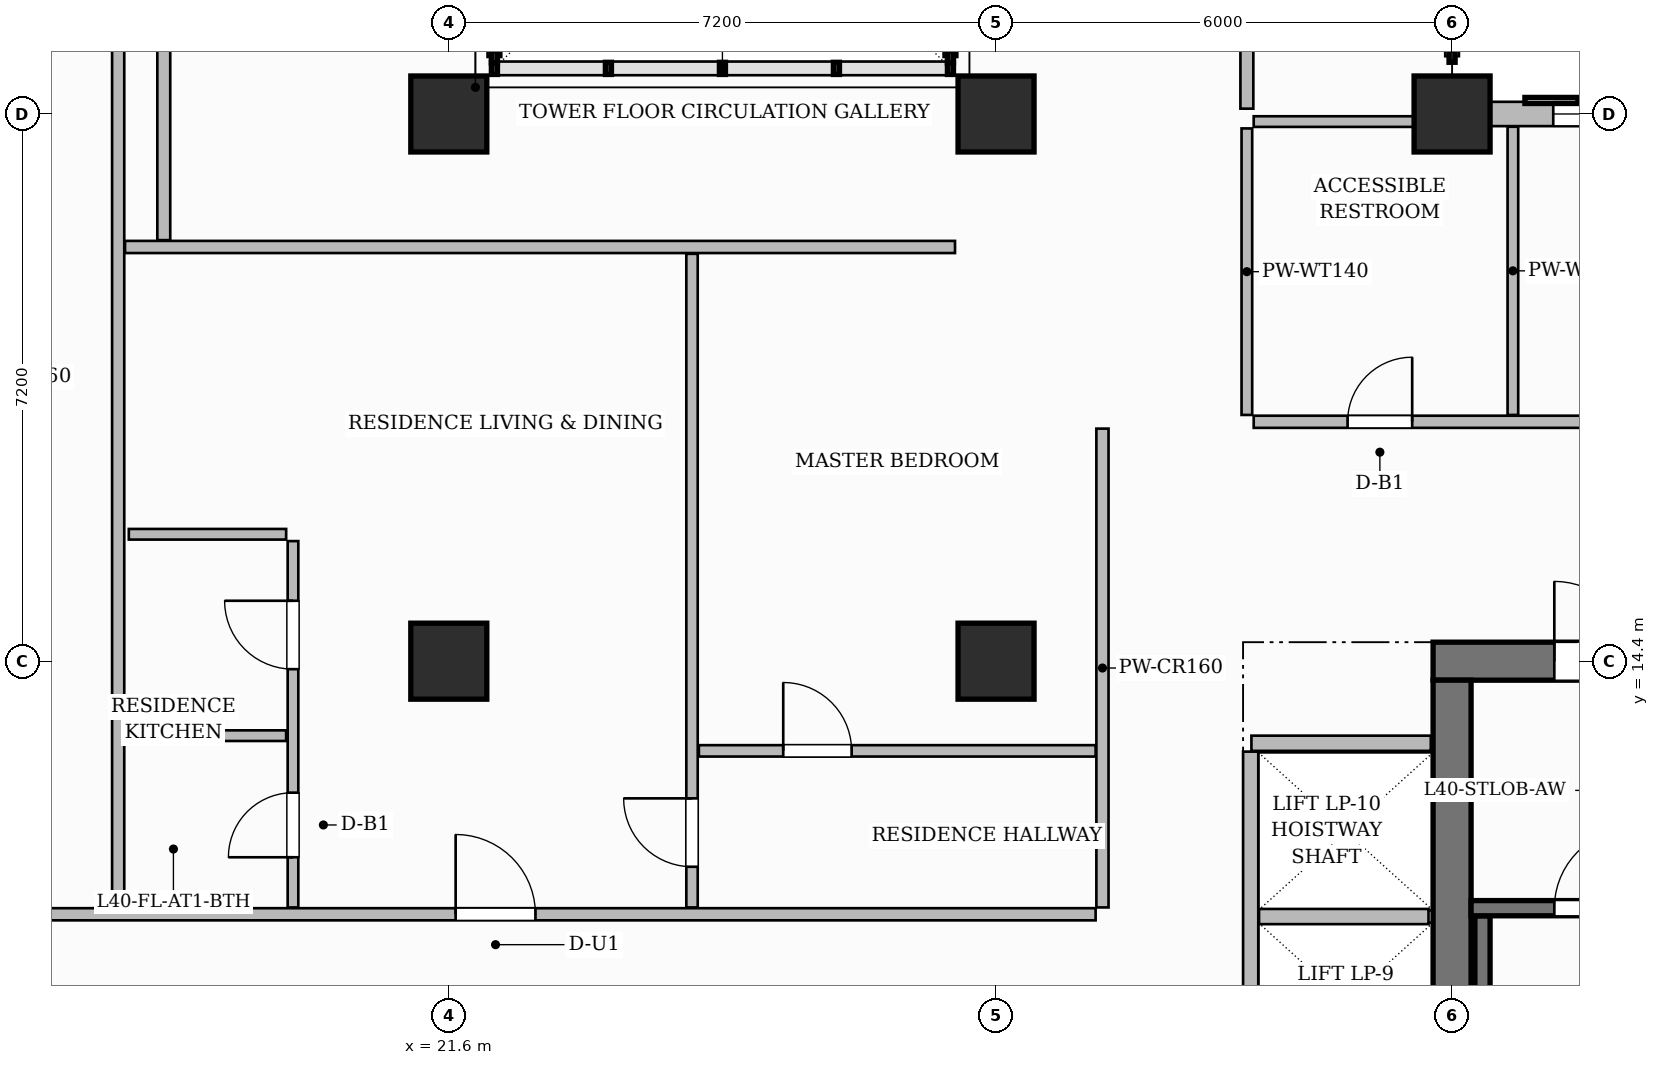
"""IFC4 building model, lengths in metres.
Left out: names, types, materials, properties, quantities, classifications, styles, units other than length and angle.
Written with IfcOpenShell. Run it as: python <this file> out.ifc"""

import sys

from ifc_helpers import new_model, si_unit, direction, frame, frame_2d, origin, origin_2d, place, context, subcontext, project, spatial, rectangle, extrude, source, transform, mapped, element, fill, save


model = new_model("IFC4")
c1 = context("Model", 3, precision=1e-05, world=origin(), true_north=direction((0.0, 1.0)))
c2 = subcontext(c1, "Body", "Model", "MODEL_VIEW")
j1 = project(units=[si_unit("LENGTHUNIT", "METRE"), si_unit("PLANEANGLEUNIT", "RADIAN")], contexts=[c1])
p1 = place(None, origin())
s1 = spatial("IfcSite", under=j1, at=p1, CompositionType="ELEMENT")
p2 = place(p1, origin())
s2 = spatial("IfcBuilding", under=s1, at=p2, CompositionType="ELEMENT")
p3 = place(p2, frame((0.0, 0.0, 161.85)))
s3 = spatial("IfcBuildingStorey", under=s2, at=p3, CompositionType="ELEMENT", Elevation=161.85)
p4 = place(p3, frame((34.55, 14.4, 0.0), z_axis=(0.0, 0.0, 1.0), x_axis=(1.0, 0.0, 0.0)))
e1 = element("IfcWall", 1, at=p4, inside=s3, PredefinedType="SHEAR", context=c2, shape_type="SweptSolid", body=[
    extrude(rectangle(XDim=15.5, YDim=0.5, at=frame_2d((7.75, 0.0))), origin(), (0.0, 0.0, 1.0), 3.85),
])
p5 = place(p4, frame((5.38, 0.0, 0.0)))
e2 = element("IfcOpeningElement", 2, at=p5, cuts=e1, PredefinedType="OPENING", context=c2, shape_type="SweptSolid", body=[
    extrude(rectangle(XDim=1.5, YDim=2.2, at=frame_2d((0.75, 1.1))), frame((0.0, 0.26, 0.0), z_axis=(0.0, -1.0, 0.0), x_axis=(1.0, 0.0, 0.0)), (0.0, 0.0, 1.0), 0.52),
])
p6 = place(p4, frame((1.595, 0.0, 0.0)))
e3 = element("IfcOpeningElement", 3, at=p6, cuts=e1, PredefinedType="OPENING", context=c2, shape_type="SweptSolid", body=[
    extrude(rectangle(XDim=1.05, YDim=2.15, at=frame_2d((0.525, 1.075))), frame((0.0, 0.26, 0.0), z_axis=(0.0, -1.0, 0.0), x_axis=(1.0, 0.0, 0.0)), (0.0, 0.0, 1.0), 0.52),
])
p7 = place(p4, frame((11.225, 0.0, 0.0)))
e4 = element("IfcOpeningElement", 4, at=p7, cuts=e1, PredefinedType="OPENING", context=c2, shape_type="SweptSolid", body=[
    extrude(rectangle(XDim=1.05, YDim=2.15, at=frame_2d((0.525, 1.075))), frame((0.0, 0.26, 0.0), z_axis=(0.0, -1.0, 0.0), x_axis=(1.0, 0.0, 0.0)), (0.0, 0.0, 1.0), 0.52),
])
p8 = place(p3, frame((34.8, 3.85, 0.0), z_axis=(0.0, 0.0, 1.0), x_axis=(0.0, 1.0, 0.0)))
e5 = element("IfcWall", 5, at=p8, inside=s3, PredefinedType="SHEAR", context=c2, shape_type="SweptSolid", body=[
    extrude(rectangle(XDim=10.3, YDim=0.5, at=frame_2d((5.15, 0.0))), origin(), (0.0, 0.0, 1.0), 3.85),
])
m1 = source(origin(), c2, "Body", "SweptSolid", [
    extrude(rectangle(XDim=1.0, YDim=1.0, at=origin_2d()), origin(), (0.0, 0.0, 1.0), 3.85),
])
for number, where, z_axis, x_axis in (
    (6, (21.6, 14.4, 0.0), (0.0, 0.0, 1.0), (1.0, 0.0, 0.0)),
    (7, (21.6, 21.6, 0.0), (0.0, 0.0, 1.0), (1.0, 0.0, 0.0)),
    (8, (28.8, 14.4, 0.0), (0.0, 0.0, 1.0), (1.0, 0.0, 0.0)),
    (9, (28.8, 21.6, 0.0), (0.0, 0.0, 1.0), (1.0, 0.0, 0.0)),
    (10, (34.8, 21.6, 0.0), (0.0, 0.0, 1.0), (1.0, 0.0, 0.0)),
):
    element("IfcColumn", number, at=place(p3, frame(where, z_axis=z_axis, x_axis=x_axis)), inside=s3, PredefinedType="COLUMN", context=c2, shape_type="MappedRepresentation", body=[
        mapped(m1, transform((0.0, 0.0, 0.0), scale=1.0)),
    ])
p9 = place(p3, frame((35.2, 4.1, 0.0), z_axis=(0.0, 0.0, 1.0), x_axis=(0.0, 1.0, 0.0)))
e11 = element("IfcWall", 11, at=p9, inside=s3, PredefinedType="SHEAR", context=c2, shape_type="SweptSolid", body=[
    extrude(rectangle(XDim=6.95, YDim=0.2, at=frame_2d((3.475, 0.0))), origin(), (0.0, 0.0, 1.0), 3.85),
])
p10 = place(p3, frame((35.05, 11.15, 0.0), z_axis=(0.0, 0.0, 1.0), x_axis=(1.0, 0.0, 0.0)))
e12 = element("IfcWall", 12, at=p10, inside=s3, PredefinedType="SHEAR", context=c2, shape_type="SweptSolid", body=[
    extrude(rectangle(XDim=3.19, YDim=0.2, at=frame_2d((1.595, 0.0))), origin(), (0.0, 0.0, 1.0), 3.85),
])
p11 = place(p10, frame((1.095, 0.0, 0.0)))
e13 = element("IfcOpeningElement", 13, at=p11, cuts=e12, PredefinedType="OPENING", context=c2, shape_type="SweptSolid", body=[
    extrude(rectangle(XDim=1.05, YDim=2.2, at=frame_2d((0.525, 1.1))), frame((0.0, 0.11, 0.0), z_axis=(0.0, -1.0, 0.0), x_axis=(1.0, 0.0, 0.0)), (0.0, 0.0, 1.0), 0.22),
])
p12 = place(p3, frame((32.16, 13.32, 0.0), z_axis=(0.0, 0.0, 1.0), x_axis=(1.0, 0.0, 0.0)))
e14 = element("IfcWall", 14, at=p12, inside=s3, PredefinedType="PARTITIONING", context=c2, shape_type="SweptSolid", body=[
    extrude(rectangle(XDim=2.36, YDim=0.2, at=frame_2d((1.18, 0.0))), origin(), (0.0, 0.0, 1.0), 3.6),
])
p13 = place(p3, frame((32.15, 4.39, 0.0), z_axis=(0.0, 0.0, 1.0), x_axis=(0.0, 1.0, 0.0)))
e15 = element("IfcWall", 15, at=p13, inside=s3, PredefinedType="PARTITIONING", context=c2, shape_type="SweptSolid", body=[
    extrude(rectangle(XDim=8.82, YDim=0.2, at=frame_2d((4.41, 0.0))), origin(), (0.0, 0.0, 1.0), 3.6),
])
p14 = place(p3, frame((32.26, 11.04, 0.0), z_axis=(0.0, 0.0, 1.0), x_axis=(1.0, 0.0, 0.0)))
e16 = element("IfcWall", 16, at=p14, inside=s3, PredefinedType="PARTITIONING", context=c2, shape_type="SweptSolid", body=[
    extrude(rectangle(XDim=2.23, YDim=0.2, at=frame_2d((1.115, 0.0))), origin(), (0.0, 0.0, 1.0), 3.6),
])
p15 = place(p3, frame((14.568, 11.07, 0.0), z_axis=(0.0, 0.0, 1.0), x_axis=(1.0, 0.0, 0.0)))
e17 = element("IfcWall", 17, at=p15, inside=s3, PredefinedType="PARTITIONING", context=c2, shape_type="SweptSolid", body=[
    extrude(rectangle(XDim=15.542, YDim=0.16, at=frame_2d((7.771, 0.0))), origin(), (0.0, 0.0, 1.0), 3.6),
])
p16 = place(p15, frame((7.122, 0.0, 0.0)))
e18 = element("IfcOpeningElement", 18, at=p16, cuts=e17, PredefinedType="OPENING", context=c2, shape_type="SweptSolid", body=[
    extrude(rectangle(XDim=1.05, YDim=2.25, at=frame_2d((0.525, 1.125))), frame((0.0, 0.09, 0.0), z_axis=(0.0, -1.0, 0.0), x_axis=(1.0, 0.0, 0.0)), (0.0, 0.0, 1.0), 0.18),
])
p17 = place(p3, frame((30.2, 11.16, 0.0), z_axis=(0.0, 0.0, 1.0), x_axis=(0.0, 1.0, 0.0)))
e19 = element("IfcWall", 19, at=p17, inside=s3, PredefinedType="PARTITIONING", context=c2, shape_type="SweptSolid", body=[
    extrude(rectangle(XDim=6.3, YDim=0.16, at=frame_2d((3.15, 0.0))), origin(), (0.0, 0.0, 1.0), 3.6),
])
p18 = place(p3, frame((32.19, 17.55, 0.0), z_axis=(0.0, 0.0, 1.0), x_axis=(1.0, 0.0, 0.0)))
e20 = element("IfcWall", 20, at=p18, inside=s3, PredefinedType="PARTITIONING", context=c2, shape_type="SweptSolid", body=[
    extrude(rectangle(XDim=17.47, YDim=0.16, at=frame_2d((8.735, 0.0))), origin(), (0.0, 0.0, 1.0), 3.6),
])
p19 = place(p18, frame((1.235, 0.0, 0.0)))
e21 = element("IfcOpeningElement", 21, at=p19, cuts=e20, PredefinedType="OPENING", context=c2, shape_type="SweptSolid", body=[
    extrude(rectangle(XDim=0.85, YDim=2.1, at=frame_2d((0.425, 1.05))), frame((0.0, 0.09, 0.0), z_axis=(0.0, -1.0, 0.0), x_axis=(1.0, 0.0, 0.0)), (0.0, 0.0, 1.0), 0.18),
])
p20 = place(p18, frame((6.61, 0.0, 0.0)))
e22 = element("IfcOpeningElement", 22, at=p20, cuts=e20, PredefinedType="OPENING", context=c2, shape_type="SweptSolid", body=[
    extrude(rectangle(XDim=1.4, YDim=2.35, at=frame_2d((0.7, 1.175))), frame((0.0, 0.09, 0.0), z_axis=(0.0, -1.0, 0.0), x_axis=(1.0, 0.0, 0.0)), (0.0, 0.0, 1.0), 0.18),
])
p21 = place(p18, frame((13.885, 0.0, 0.0)))
e23 = element("IfcOpeningElement", 23, at=p21, cuts=e20, PredefinedType="OPENING", context=c2, shape_type="SweptSolid", body=[
    extrude(rectangle(XDim=0.95, YDim=2.15, at=frame_2d((0.475, 1.075))), frame((0.0, 0.09, 0.0), z_axis=(0.0, -1.0, 0.0), x_axis=(1.0, 0.0, 0.0)), (0.0, 0.0, 1.0), 0.18),
])
p22 = place(p3, frame((32.1, 17.64, 0.0), z_axis=(0.0, 0.0, 1.0), x_axis=(0.0, 1.0, 0.0)))
e24 = element("IfcWall", 24, at=p22, inside=s3, PredefinedType="PARTITIONING", context=c2, shape_type="SweptSolid", body=[
    extrude(rectangle(XDim=3.77, YDim=0.14, at=frame_2d((1.885, 0.0))), origin(), (0.0, 0.0, 1.0), 3.6),
])
p23 = place(p3, frame((35.6, 17.64, 0.0), z_axis=(0.0, 0.0, 1.0), x_axis=(0.0, 1.0, 0.0)))
e25 = element("IfcWall", 25, at=p23, inside=s3, PredefinedType="PARTITIONING", context=c2, shape_type="SweptSolid", body=[
    extrude(rectangle(XDim=3.792, YDim=0.14, at=frame_2d((1.896, 0.0))), origin(), (0.0, 0.0, 1.0), 3.6),
])
p24 = place(p3, frame((17.25, 11.16, 0.0), z_axis=(0.0, 0.0, 1.0), x_axis=(0.0, 1.0, 0.0)))
e26 = element("IfcWall", 26, at=p24, inside=s3, PredefinedType="PARTITIONING", context=c2, shape_type="SweptSolid", body=[
    extrude(rectangle(XDim=13.95, YDim=0.16, at=frame_2d((6.975, 0.0))), origin(), (0.0, 0.0, 1.0), 3.6),
])
p25 = place(p3, frame((17.85, 19.94, 0.0), z_axis=(0.0, 0.0, 1.0), x_axis=(0.0, 1.0, 0.0)))
e27 = element("IfcWall", 27, at=p25, inside=s3, PredefinedType="PARTITIONING", context=c2, shape_type="SweptSolid", body=[
    extrude(rectangle(XDim=5.22, YDim=0.17, at=frame_2d((2.61, 0.0))), origin(), (0.0, 0.0, 1.0), 3.285),
])
p26 = place(p3, frame((17.34, 19.85, 0.0), z_axis=(0.0, 0.0, 1.0), x_axis=(1.0, 0.0, 0.0)))
e28 = element("IfcWall", 28, at=p26, inside=s3, PredefinedType="PARTITIONING", context=c2, shape_type="SweptSolid", body=[
    extrude(rectangle(XDim=10.92, YDim=0.16, at=frame_2d((5.46, 0.0))), origin(), (0.0, 0.0, 1.0), 3.6),
])
p27 = place(p3, frame((32.19, 21.5, 0.0), z_axis=(0.0, 0.0, 1.0), x_axis=(1.0, 0.0, 0.0)))
e29 = element("IfcWall", 29, at=p27, inside=s3, PredefinedType="PARTITIONING", context=c2, shape_type="SweptSolid", body=[
    extrude(rectangle(XDim=2.42, YDim=0.14, at=frame_2d((1.21, 0.0))), origin(), (0.0, 0.0, 1.0), 3.085),
])
p28 = place(p3, frame((32.1, 21.67, 0.0), z_axis=(0.0, 0.0, 1.0), x_axis=(0.0, 1.0, 0.0)))
e30 = element("IfcWall", 30, at=p28, inside=s3, PredefinedType="PARTITIONING", context=c2, shape_type="SweptSolid", body=[
    extrude(rectangle(XDim=10.702, YDim=0.17, at=frame_2d((5.351, 0.0))), origin(), (0.0, 0.0, 1.0), 3.6),
])
p29 = place(p28, frame((4.43, 0.0, 0.0)))
e31 = element("IfcOpeningElement", 31, at=p29, cuts=e30, PredefinedType="OPENING", context=c2, shape_type="SweptSolid", body=[
    extrude(rectangle(XDim=1.4, YDim=2.35, at=frame_2d((0.7, 1.175))), frame((0.0, 0.095, 0.0), z_axis=(0.0, -1.0, 0.0), x_axis=(1.0, 0.0, 0.0)), (0.0, 0.0, 1.0), 0.19),
])
p30 = place(p3, frame((19.55, 11.16, 0.0), z_axis=(0.0, 0.0, 1.0), x_axis=(0.0, 1.0, 0.0)))
e32 = element("IfcWall", 32, at=p30, inside=s3, PredefinedType="PARTITIONING", context=c2, shape_type="SweptSolid", body=[
    extrude(rectangle(XDim=4.82, YDim=0.14, at=frame_2d((2.41, 0.0))), origin(), (0.0, 0.0, 1.0), 3.6),
])
p31 = place(p30, frame((0.66, 0.0, 0.0)))
e33 = element("IfcOpeningElement", 33, at=p31, cuts=e32, PredefinedType="OPENING", context=c2, shape_type="SweptSolid", body=[
    extrude(rectangle(XDim=0.85, YDim=2.1, at=frame_2d((0.425, 1.05))), frame((0.0, 0.08, 0.0), z_axis=(0.0, -1.0, 0.0), x_axis=(1.0, 0.0, 0.0)), (0.0, 0.0, 1.0), 0.16),
])
p32 = place(p30, frame((3.135, 0.0, 0.0)))
e34 = element("IfcOpeningElement", 34, at=p32, cuts=e32, PredefinedType="OPENING", context=c2, shape_type="SweptSolid", body=[
    extrude(rectangle(XDim=0.9, YDim=2.15, at=frame_2d((0.45, 1.075))), frame((0.0, 0.08, 0.0), z_axis=(0.0, -1.0, 0.0), x_axis=(1.0, 0.0, 0.0)), (0.0, 0.0, 1.0), 0.16),
])
for number, where, z_axis, x_axis in (
    (35, (17.39, 13.42, 0.0), (0.0, 0.0, 1.0), (1.0, 0.0, 0.0)),
    (36, (17.39, 16.07, 0.0), (0.0, 0.0, 1.0), (1.0, 0.0, 0.0)),
):
    element("IfcWall", number, at=place(p3, frame(where, z_axis=z_axis, x_axis=x_axis)), inside=s3, PredefinedType="PARTITIONING", context=c2, shape_type="SweptSolid", body=[
        extrude(rectangle(XDim=2.07, YDim=0.14, at=frame_2d((1.035, 0.0))), origin(), (0.0, 0.0, 1.0), 3.6),
    ])
p33 = place(p3, frame((24.8, 11.16, 0.0), z_axis=(0.0, 0.0, 1.0), x_axis=(0.0, 1.0, 0.0)))
e37 = element("IfcWall", 37, at=p33, inside=s3, PredefinedType="PARTITIONING", context=c2, shape_type="SweptSolid", body=[
    extrude(rectangle(XDim=8.6, YDim=0.15, at=frame_2d((4.3, 0.0))), origin(), (0.0, 0.0, 1.0), 3.6),
])
p34 = place(p33, frame((0.535, 0.0, 0.0)))
e38 = element("IfcOpeningElement", 38, at=p34, cuts=e37, PredefinedType="OPENING", context=c2, shape_type="SweptSolid", body=[
    extrude(rectangle(XDim=0.9, YDim=2.15, at=frame_2d((0.45, 1.075))), frame((0.0, 0.085, 0.0), z_axis=(0.0, -1.0, 0.0), x_axis=(1.0, 0.0, 0.0)), (0.0, 0.0, 1.0), 0.17),
])
p35 = place(p3, frame((24.89, 13.22, 0.0), z_axis=(0.0, 0.0, 1.0), x_axis=(1.0, 0.0, 0.0)))
e39 = element("IfcWall", 39, at=p35, inside=s3, PredefinedType="PARTITIONING", context=c2, shape_type="SweptSolid", body=[
    extrude(rectangle(XDim=5.22, YDim=0.15, at=frame_2d((2.61, 0.0))), origin(), (0.0, 0.0, 1.0), 3.6),
])
p36 = place(p35, frame((1.11, 0.0, 0.0)))
e40 = element("IfcOpeningElement", 40, at=p36, cuts=e39, PredefinedType="OPENING", context=c2, shape_type="SweptSolid", body=[
    extrude(rectangle(XDim=0.9, YDim=2.15, at=frame_2d((0.45, 1.075))), frame((0.0, 0.085, 0.0), z_axis=(0.0, -1.0, 0.0), x_axis=(1.0, 0.0, 0.0)), (0.0, 0.0, 1.0), 0.17),
])
p37 = place(p3, frame((34.8, 21.6, 0.0), z_axis=(0.0, 0.0, 1.0), x_axis=(1.0, 0.0, 0.0)))
e41 = element("IfcWall", 41, at=p37, inside=s3, PredefinedType="SOLIDWALL", context=c2, shape_type="SweptSolid", body=[
    extrude(rectangle(XDim=15.0, YDim=0.32, at=frame_2d((7.5, 0.0))), origin(), (0.0, 0.0, 1.0), 3.085),
])
p38 = place(p37, frame((1.331, 0.0, 0.8)))
e42 = element("IfcOpeningElement", 42, at=p38, cuts=e41, PredefinedType="OPENING", context=c2, shape_type="SweptSolid", body=[
    extrude(rectangle(XDim=1.8, YDim=1.85, at=frame_2d((0.9, 0.925))), frame((0.0, 0.17, 0.0), z_axis=(0.0, -1.0, 0.0), x_axis=(1.0, 0.0, 0.0)), (0.0, 0.0, 1.0), 0.34),
])
p39 = place(p37, frame((4.077, 0.0, 0.8)))
e43 = element("IfcOpeningElement", 43, at=p39, cuts=e41, PredefinedType="OPENING", context=c2, shape_type="SweptSolid", body=[
    extrude(rectangle(XDim=1.8, YDim=1.85, at=frame_2d((0.9, 0.925))), frame((0.0, 0.17, 0.0), z_axis=(0.0, -1.0, 0.0), x_axis=(1.0, 0.0, 0.0)), (0.0, 0.0, 1.0), 0.34),
])
p40 = place(p37, frame((9.131, 0.0, 0.8)))
e44 = element("IfcOpeningElement", 44, at=p40, cuts=e41, PredefinedType="OPENING", context=c2, shape_type="SweptSolid", body=[
    extrude(rectangle(XDim=1.8, YDim=1.85, at=frame_2d((0.9, 0.925))), frame((0.0, 0.17, 0.0), z_axis=(0.0, -1.0, 0.0), x_axis=(1.0, 0.0, 0.0)), (0.0, 0.0, 1.0), 0.34),
])
p41 = place(p37, frame((11.877, 0.0, 0.8)))
e45 = element("IfcOpeningElement", 45, at=p41, cuts=e41, PredefinedType="OPENING", context=c2, shape_type="SweptSolid", body=[
    extrude(rectangle(XDim=1.8, YDim=1.85, at=frame_2d((0.9, 0.925))), frame((0.0, 0.17, 0.0), z_axis=(0.0, -1.0, 0.0), x_axis=(1.0, 0.0, 0.0)), (0.0, 0.0, 1.0), 0.34),
])
m2 = source(origin(), c2, "Body", "SweptSolid", [
    extrude(rectangle(XDim=1.05, YDim=2.2, at=frame_2d((0.525, 1.1))), frame((0.0, 0.025, 0.0), z_axis=(0.0, -1.0, 0.0), x_axis=(1.0, 0.0, 0.0)), (0.0, 0.0, 1.0), 0.05),
])
p42 = place(p11, origin())
e46 = element("IfcDoor", 46, at=p42, inside=s3, OperationType="SINGLE_SWING_RIGHT", PredefinedType="DOOR", context=c2, shape_type="MappedRepresentation", body=[
    mapped(m2, transform((0.0, 0.0, 0.0), scale=1.0)),
])
fill(e13, e46)
m3 = source(origin(), c2, "Body", "SweptSolid", [
    extrude(rectangle(XDim=1.05, YDim=2.15, at=frame_2d((0.525, 1.075))), frame((0.0, 0.025, 0.0), z_axis=(0.0, -1.0, 0.0), x_axis=(1.0, 0.0, 0.0)), (0.0, 0.0, 1.0), 0.05),
])
p43 = place(p6, origin())
e47 = element("IfcDoor", 47, at=p43, inside=s3, OperationType="SINGLE_SWING_LEFT", PredefinedType="DOOR", context=c2, shape_type="MappedRepresentation", body=[
    mapped(m3, transform((0.0, 0.0, 0.0), scale=1.0)),
])
fill(e3, e47)
m4 = source(origin(), c2, "Body", "SweptSolid", [
    extrude(rectangle(XDim=0.85, YDim=2.1, at=frame_2d((0.425, 1.05))), frame((0.0, 0.025, 0.0), z_axis=(0.0, -1.0, 0.0), x_axis=(1.0, 0.0, 0.0)), (0.0, 0.0, 1.0), 0.05),
])
p44 = place(p19, origin())
e48 = element("IfcDoor", 48, at=p44, inside=s3, OperationType="SINGLE_SWING_RIGHT", PredefinedType="DOOR", context=c2, shape_type="MappedRepresentation", body=[
    mapped(m4, transform((0.0, 0.0, 0.0), scale=1.0)),
])
fill(e21, e48)
p45 = place(p31, origin())
e49 = element("IfcDoor", 49, at=p45, inside=s3, OperationType="SINGLE_SWING_LEFT", PredefinedType="DOOR", context=c2, shape_type="MappedRepresentation", body=[
    mapped(m4, transform((0.0, 0.0, 0.0), scale=1.0)),
])
fill(e33, e49)
m5 = source(origin(), c2, "Body", "SweptSolid", [
    extrude(rectangle(XDim=0.9, YDim=2.15, at=frame_2d((0.45, 1.075))), frame((0.0, 0.025, 0.0), z_axis=(0.0, -1.0, 0.0), x_axis=(1.0, 0.0, 0.0)), (0.0, 0.0, 1.0), 0.05),
])
p46 = place(p32, origin())
e50 = element("IfcDoor", 50, at=p46, inside=s3, OperationType="SINGLE_SWING_RIGHT", PredefinedType="DOOR", context=c2, shape_type="MappedRepresentation", body=[
    mapped(m5, transform((0.0, 0.0, 0.0), scale=1.0)),
])
fill(e34, e50)
m6 = source(origin(), c2, "Body", "SweptSolid", [
    extrude(rectangle(XDim=1.05, YDim=2.25, at=frame_2d((0.525, 1.125))), frame((0.0, 0.025, 0.0), z_axis=(0.0, -1.0, 0.0), x_axis=(1.0, 0.0, 0.0)), (0.0, 0.0, 1.0), 0.05),
])
p47 = place(p16, origin())
e51 = element("IfcDoor", 51, at=p47, inside=s3, OperationType="SINGLE_SWING_LEFT", PredefinedType="DOOR", context=c2, shape_type="MappedRepresentation", body=[
    mapped(m6, transform((0.0, 0.0, 0.0), scale=1.0)),
])
fill(e18, e51)
p48 = place(p34, origin())
e52 = element("IfcDoor", 52, at=p48, inside=s3, OperationType="SINGLE_SWING_RIGHT", PredefinedType="DOOR", context=c2, shape_type="MappedRepresentation", body=[
    mapped(m5, transform((0.0, 0.0, 0.0), scale=1.0)),
])
fill(e38, e52)
p49 = place(p36, origin())
e53 = element("IfcDoor", 53, at=p49, inside=s3, OperationType="SINGLE_SWING_LEFT", PredefinedType="DOOR", context=c2, shape_type="MappedRepresentation", body=[
    mapped(m5, transform((0.0, 0.0, 0.0), scale=1.0)),
])
fill(e40, e53)
m7 = source(origin(), c2, "Body", "SweptSolid", [
    extrude(rectangle(XDim=1.8, YDim=1.85, at=frame_2d((0.9, 0.925))), frame((0.0, 0.03, 0.0), z_axis=(0.0, -1.0, 0.0), x_axis=(1.0, 0.0, 0.0)), (0.0, 0.0, 1.0), 0.06),
])
p50 = place(p38, origin())
e54 = element("IfcWindow", 54, at=p50, inside=s3, PartitioningType="DOUBLE_PANEL_VERTICAL", PredefinedType="WINDOW", context=c2, shape_type="MappedRepresentation", body=[
    mapped(m7, transform((0.0, 0.0, 0.0), scale=1.0)),
])
fill(e42, e54)
save(model, sys.argv[1])
